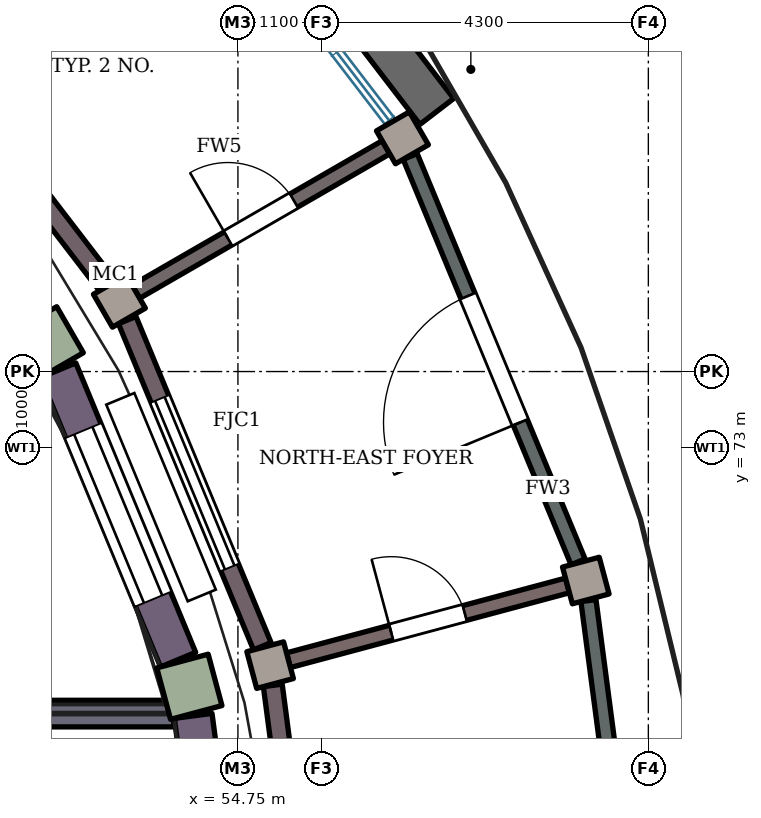
"""IFC4 building model, lengths in metres.
Left out: names, types, materials, properties, quantities, classifications, styles, units other than length and angle.
Written with IfcOpenShell. Run it as: python <this file> out.ifc"""

import sys

from ifc_helpers import new_model, si_unit, direction, frame, frame_2d, origin, origin_2d, place, context, subcontext, project, spatial, rectangle, extrude, element, fill, save


model = new_model("IFC4")
c1 = context("Model", 3, precision=1e-05, world=origin(), true_north=direction((0.0, 1.0)))
c2 = subcontext(c1, "Body", "Model", "MODEL_VIEW")
j1 = project(units=[si_unit("LENGTHUNIT", "METRE"), si_unit("PLANEANGLEUNIT", "RADIAN")], contexts=[c1])
p1 = place(None, origin())
s1 = spatial("IfcSite", under=j1, at=p1, CompositionType="ELEMENT")
p2 = place(p1, origin())
s2 = spatial("IfcBuilding", under=s1, at=p2, CompositionType="ELEMENT")
p3 = place(p2, origin())
s3 = spatial("IfcBuildingStorey", under=s2, at=p3, CompositionType="ELEMENT", Elevation=0.0)
for number, where, z_axis, x_axis in (
    (1, (54.111, 69.853, 0.0), (0.0, 0.0, 1.0), (0.966, 0.259, 0.0)),
    (2, (52.238, 74.375, 0.0), (0.0, 0.0, 1.0), (0.866, 0.5, 0.0)),
):
    element("IfcColumn", number, at=place(p3, frame(where, z_axis=z_axis, x_axis=x_axis)), inside=s3, PredefinedType="COLUMN", context=c2, shape_type="SweptSolid", body=[
        extrude(rectangle(XDim=0.7, YDim=0.7, at=origin_2d()), origin(), (0.0, 0.0, 1.0), 4.2),
    ])
p4 = place(p3, frame((54.699, 65.383, 0.0), z_axis=(0.0, 0.0, 1.0), x_axis=(-0.130483623501, 0.991450464722, 0.0)))
e3 = element("IfcWall", 3, at=p4, inside=s3, PredefinedType="SHEAR", context=c2, shape_type="SweptSolid", body=[
    extrude(rectangle(XDim=4.122, YDim=0.5, at=frame_2d((2.061, 0.0))), origin(), (0.0, 0.0, 1.0), 3.4),
])
p5 = place(p3, frame((53.963, 70.21, 0.0), z_axis=(0.0, 0.0, 1.0), x_axis=(-0.382688328955, 0.923877504262, 0.0)))
e4 = element("IfcWall", 4, at=p5, inside=s3, PredefinedType="SHEAR", context=c2, shape_type="SweptSolid", body=[
    extrude(rectangle(XDim=4.122, YDim=0.5, at=frame_2d((2.061, 0.0))), origin(), (0.0, 0.0, 1.0), 3.4),
])
p6 = place(p5, frame((0.861, 0.0, 0.0)))
e5 = element("IfcOpeningElement", 5, at=p6, cuts=e4, PredefinedType="OPENING", context=c2, shape_type="SweptSolid", body=[
    extrude(rectangle(XDim=2.4, YDim=3.2, at=frame_2d((1.2, 1.6))), frame((0.0, 0.26, 0.0), z_axis=(0.0, -1.0, 0.0), x_axis=(1.0, 0.0, 0.0)), (0.0, 0.0, 1.0), 0.52),
])
for number, where, z_axis, x_axis in (
    (6, (55.174, 70.137, 0.0), (0.0, 0.0, 1.0), (0.966, 0.259, 0.0)),
    (7, (53.191, 74.925, 0.0), (0.0, 0.0, 1.0), (0.866, 0.5, 0.0)),
    (8, (59.327, 71.25, 0.0), (0.0, 0.0, 1.0), (0.966, 0.259, 0.0)),
    (9, (56.915, 77.075, 0.0), (0.0, 0.0, 1.0), (0.866, 0.5, 0.0)),
):
    element("IfcColumn", number, at=place(p3, frame(where, z_axis=z_axis, x_axis=x_axis)), inside=s3, PredefinedType="COLUMN", context=c2, shape_type="SweptSolid", body=[
        extrude(rectangle(XDim=0.5, YDim=0.5, at=origin_2d()), origin(), (0.0, 0.0, 1.0), 4.2),
    ])
p7 = place(p3, frame((55.815, 65.267, 0.0), z_axis=(0.0, 0.0, 1.0), x_axis=(-0.130541551055, 0.991442839224, 0.0)))
e10 = element("IfcWall", 10, at=p7, inside=s3, PredefinedType="SHEAR", context=c2, shape_type="SweptSolid", body=[
    extrude(rectangle(XDim=4.644, YDim=0.25, at=frame_2d((2.322, 0.0))), origin(), (0.0, 0.0, 1.0), 3.6),
])
p8 = place(p3, frame((55.071, 70.386, 0.0), z_axis=(0.0, 0.0, 1.0), x_axis=(-0.382658268537, 0.923889955309, 0.0)))
e11 = element("IfcWall", 11, at=p8, inside=s3, PredefinedType="SHEAR", context=c2, shape_type="SweptSolid", body=[
    extrude(rectangle(XDim=4.644, YDim=0.25, at=frame_2d((2.322, 0.0))), origin(), (0.0, 0.0, 1.0), 3.6),
])
p9 = place(p8, frame((1.122, 0.0, 0.0)))
e12 = element("IfcOpeningElement", 12, at=p9, cuts=e11, PredefinedType="OPENING", context=c2, shape_type="SweptSolid", body=[
    extrude(rectangle(XDim=2.4, YDim=2.6, at=frame_2d((1.2, 1.3))), frame((0.0, 0.135, 0.0), z_axis=(0.0, -1.0, 0.0), x_axis=(1.0, 0.0, 0.0)), (0.0, 0.0, 1.0), 0.27),
])
p10 = place(p3, frame((53.027, 75.138, 0.0), z_axis=(0.0, 0.0, 1.0), x_axis=(-0.608762612058, 0.793352432504, 0.0)))
e13 = element("IfcWall", 13, at=p10, inside=s3, PredefinedType="SHEAR", context=c2, shape_type="SweptSolid", body=[
    extrude(rectangle(XDim=4.644, YDim=0.25, at=frame_2d((2.322, 0.0))), origin(), (0.0, 0.0, 1.0), 3.6),
])
p11 = place(p3, frame((60.115, 65.263, 0.0), z_axis=(0.0, 0.0, 1.0), x_axis=(-0.130512494435, 0.991446664625, 0.0)))
e14 = element("IfcWall", 14, at=p11, inside=s3, PredefinedType="STANDARD", context=c2, shape_type="SweptSolid", body=[
    extrude(rectangle(XDim=5.773, YDim=0.2, at=frame_2d((2.886, 0.0))), origin(), (0.0, 0.0, 1.0), 3.5),
])
p12 = place(p11, frame((1.986, 0.0, 0.0)))
e15 = element("IfcOpeningElement", 15, at=p12, cuts=e14, PredefinedType="OPENING", context=c2, shape_type="SweptSolid", body=[
    extrude(rectangle(XDim=1.8, YDim=2.4, at=frame_2d((0.9, 1.2))), frame((0.0, 0.11, 0.0), z_axis=(0.0, -1.0, 0.0), x_axis=(1.0, 0.0, 0.0)), (0.0, 0.0, 1.0), 0.22),
])
p13 = place(p3, frame((59.225, 71.496, 0.0), z_axis=(0.0, 0.0, 1.0), x_axis=(-0.382665553446, 0.923886938, 0.0)))
e16 = element("IfcWall", 16, at=p13, inside=s3, PredefinedType="STANDARD", context=c2, shape_type="SweptSolid", body=[
    extrude(rectangle(XDim=5.773, YDim=0.2, at=frame_2d((2.886, 0.0))), origin(), (0.0, 0.0, 1.0), 3.5),
])
p14 = place(p13, frame((1.986, 0.0, 0.0)))
e17 = element("IfcOpeningElement", 17, at=p14, cuts=e16, PredefinedType="OPENING", context=c2, shape_type="SweptSolid", body=[
    extrude(rectangle(XDim=1.8, YDim=2.4, at=frame_2d((0.9, 1.2))), frame((0.0, 0.11, 0.0), z_axis=(0.0, -1.0, 0.0), x_axis=(1.0, 0.0, 0.0)), (0.0, 0.0, 1.0), 0.22),
])
p15 = place(p3, frame((57.367, 77.422, 0.0), z_axis=(0.0, 0.0, 1.0), x_axis=(-0.60874074273, 0.793369213003, 0.0)))
e18 = element("IfcWall", 18, at=p15, inside=s3, PredefinedType="STANDARD", context=c2, shape_type="SweptSolid", body=[
    extrude(rectangle(XDim=6.365, YDim=0.56, at=frame_2d((3.182, 0.0))), origin(), (0.0, 0.0, 1.0), 0.3),
])
p16 = place(p3, frame((44.0, 69.5, 0.0), z_axis=(0.0, 0.0, 1.0), x_axis=(1.0, 0.0, 0.0)))
e19 = element("IfcWall", 19, at=p16, inside=s3, PredefinedType="STANDARD", context=c2, shape_type="SweptSolid", body=[
    extrude(rectangle(XDim=9.906, YDim=0.35, at=frame_2d((4.953, 0.0))), origin(), (0.0, 0.0, 1.0), 24.5),
])
p17 = place(p3, frame((55.415, 70.202, 0.0), z_axis=(0.0, 0.0, 1.0), x_axis=(0.965919660258, 0.258842055948, 0.0)))
e20 = element("IfcWall", 20, at=p17, inside=s3, PredefinedType="STANDARD", context=c2, shape_type="SweptSolid", body=[
    extrude(rectangle(XDim=3.8, YDim=0.2, at=frame_2d((1.9, 0.0))), origin(), (0.0, 0.0, 1.0), 4.0),
])
p18 = place(p17, frame((1.4, 0.0, 0.0)))
e21 = element("IfcOpeningElement", 21, at=p18, cuts=e20, PredefinedType="OPENING", context=c2, shape_type="SweptSolid", body=[
    extrude(rectangle(XDim=1.0, YDim=2.1, at=frame_2d((0.5, 1.05))), frame((0.0, 0.11, 0.0), z_axis=(0.0, -1.0, 0.0), x_axis=(1.0, 0.0, 0.0)), (0.0, 0.0, 1.0), 0.22),
])
p19 = place(p3, frame((53.407, 75.05, 0.0), z_axis=(0.0, 0.0, 1.0), x_axis=(0.866028304915, 0.499994975061, 0.0)))
e22 = element("IfcWall", 22, at=p19, inside=s3, PredefinedType="PARTITIONING", context=c2, shape_type="SweptSolid", body=[
    extrude(rectangle(XDim=3.8, YDim=0.2, at=frame_2d((1.9, 0.0))), origin(), (0.0, 0.0, 1.0), 4.0),
])
p20 = place(p19, frame((1.4, 0.0, 0.0)))
e23 = element("IfcOpeningElement", 23, at=p20, cuts=e22, PredefinedType="OPENING", context=c2, shape_type="SweptSolid", body=[
    extrude(rectangle(XDim=1.0, YDim=2.1, at=frame_2d((0.5, 1.05))), frame((0.0, 0.11, 0.0), z_axis=(0.0, -1.0, 0.0), x_axis=(1.0, 0.0, 0.0)), (0.0, 0.0, 1.0), 0.22),
])
p21 = place(p6, origin())
e24 = element("IfcDoor", 24, at=p21, inside=s3, OperationType="DOUBLE_DOOR_SLIDING", PredefinedType="DOOR", context=c2, shape_type="SweptSolid", body=[
    extrude(rectangle(XDim=2.4, YDim=3.2, at=frame_2d((1.2, 1.6))), frame((0.0, 0.025, 0.0), z_axis=(0.0, -1.0, 0.0), x_axis=(1.0, 0.0, 0.0)), (0.0, 0.0, 1.0), 0.05),
])
fill(e5, e24)
p22 = place(p14, origin())
e25 = element("IfcDoor", 25, at=p22, inside=s3, OperationType="DOUBLE_DOOR_DOUBLE_SWING", PredefinedType="DOOR", context=c2, shape_type="SweptSolid", body=[
    extrude(rectangle(XDim=1.8, YDim=2.4, at=frame_2d((0.9, 1.2))), frame((0.0, 0.025, 0.0), z_axis=(0.0, -1.0, 0.0), x_axis=(1.0, 0.0, 0.0)), (0.0, 0.0, 1.0), 0.05),
])
fill(e17, e25)
p23 = place(p9, origin())
e26 = element("IfcDoor", 26, at=p23, inside=s3, OperationType="DOUBLE_DOOR_SLIDING", PredefinedType="DOOR", context=c2, shape_type="SweptSolid", body=[
    extrude(rectangle(XDim=2.4, YDim=2.6, at=frame_2d((1.2, 1.3))), frame((0.0, 0.025, 0.0), z_axis=(0.0, -1.0, 0.0), x_axis=(1.0, 0.0, 0.0)), (0.0, 0.0, 1.0), 0.05),
])
fill(e12, e26)
p24 = place(p18, origin())
e27 = element("IfcDoor", 27, at=p24, inside=s3, OperationType="SINGLE_SWING_LEFT", PredefinedType="DOOR", context=c2, shape_type="SweptSolid", body=[
    extrude(rectangle(XDim=1.0, YDim=2.1, at=frame_2d((0.5, 1.05))), frame((0.0, 0.025, 0.0), z_axis=(0.0, -1.0, 0.0), x_axis=(1.0, 0.0, 0.0)), (0.0, 0.0, 1.0), 0.05),
])
fill(e21, e27)
p25 = place(p20, origin())
e28 = element("IfcDoor", 28, at=p25, inside=s3, OperationType="SINGLE_SWING_LEFT", PredefinedType="DOOR", context=c2, shape_type="SweptSolid", body=[
    extrude(rectangle(XDim=1.0, YDim=2.1, at=frame_2d((0.5, 1.05))), frame((0.0, 0.025, 0.0), z_axis=(0.0, -1.0, 0.0), x_axis=(1.0, 0.0, 0.0)), (0.0, 0.0, 1.0), 0.05),
])
fill(e23, e28)
save(model, sys.argv[1])
